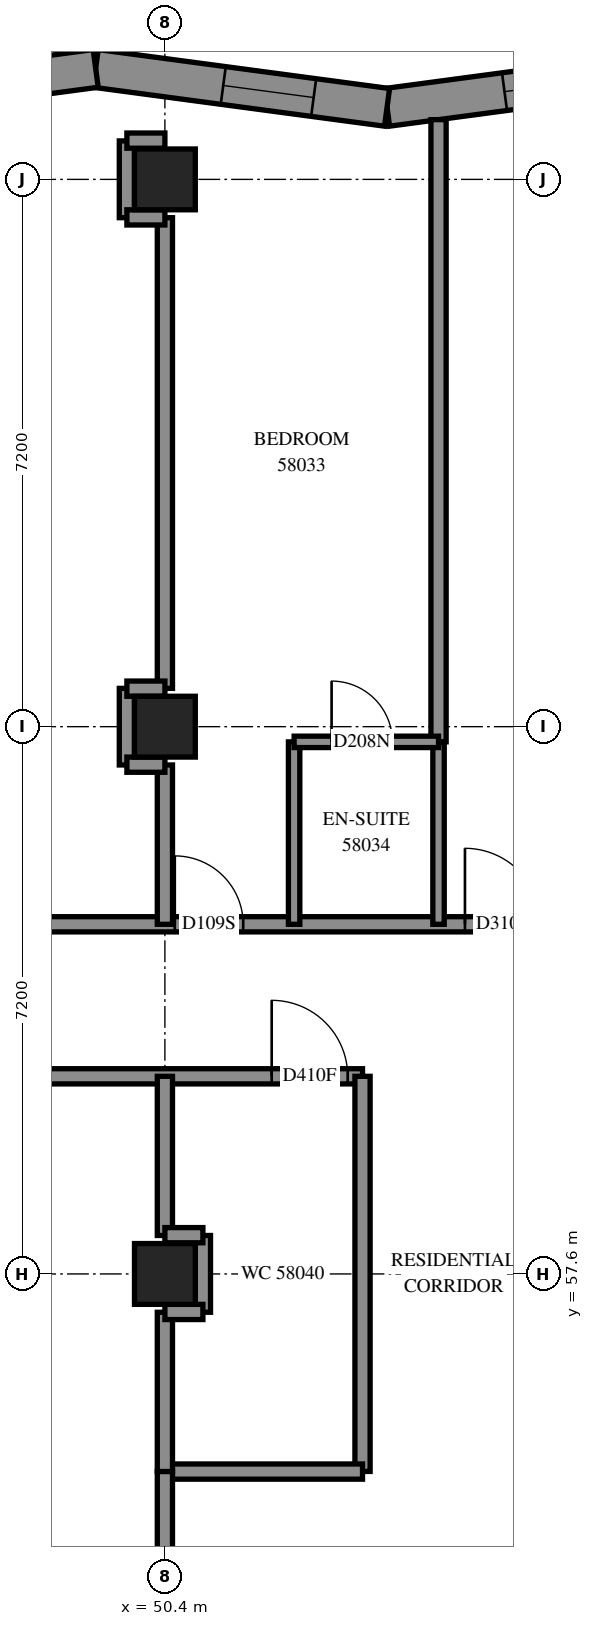
"""IFC4 building model, lengths in metres.
Left out: names, types, materials, properties, quantities, classifications, styles, units other than length and angle.
Written with IfcOpenShell. Run it as: python <this file> out.ifc"""

import sys

from ifc_helpers import new_model, si_unit, direction, frame, frame_2d, origin, origin_2d, place, context, subcontext, project, spatial, polyline, rectangle, outline, extrude, element, fill, save


model = new_model("IFC4")
c1 = context("Model", 3, precision=1e-05, world=origin(), true_north=direction((0.0, 1.0)))
c2 = subcontext(c1, "Body", "Model", "MODEL_VIEW")
j1 = project(units=[si_unit("LENGTHUNIT", "METRE"), si_unit("PLANEANGLEUNIT", "RADIAN")], contexts=[c1])
p1 = place(None, origin())
s1 = spatial("IfcSite", under=j1, at=p1, CompositionType="ELEMENT")
p2 = place(p1, origin())
s2 = spatial("IfcBuilding", under=s1, at=p2, CompositionType="ELEMENT")
p3 = place(p2, frame((0.0, 0.0, 213.4)))
s3 = spatial("IfcBuildingStorey", under=s2, at=p3, CompositionType="ELEMENT", Elevation=213.4)
for number, where, z_axis, x_axis in (
    (1, (50.4, 57.6, 0.0), (0.0, 0.0, 1.0), (1.0, 0.0, 0.0)),
    (2, (50.4, 64.8, 0.0), (0.0, 0.0, 1.0), (1.0, 0.0, 0.0)),
    (3, (50.4, 72.0, 0.0), (0.0, 0.0, 1.0), (1.0, 0.0, 0.0)),
):
    element("IfcColumn", number, at=place(p3, frame(where, z_axis=z_axis, x_axis=x_axis)), inside=s3, PredefinedType="COLUMN", context=c2, shape_type="SweptSolid", body=[
        extrude(rectangle(XDim=0.8, YDim=0.8, at=origin_2d()), origin(), (0.0, 0.0, 1.0), 3.1),
    ])
p4 = place(p3, frame((57.156, 73.46, 0.0), z_axis=(0.0, 0.0, 1.0), x_axis=(-0.9911985198, -0.13238389, 0.0)))
e4 = element("IfcWall", 4, at=p4, inside=s3, PredefinedType="SOLIDWALL", context=c2, shape_type="SweptSolid", body=[
    extrude(outline(polyline([(-0.033, -0.25), (3.834, -0.25), (3.901, 0.25), (0.033, 0.25), (-0.033, -0.25)])), origin(), (0.0, 0.0, 1.0), 3.1),
])
p5 = place(p4, frame((1.109, 0.0, 0.45)))
e5 = element("IfcOpeningElement", 5, at=p5, cuts=e4, PredefinedType="OPENING", context=c2, shape_type="SweptSolid", body=[
    extrude(rectangle(XDim=1.2, YDim=2.5, at=frame_2d((0.6, 1.25))), frame((0.0, 0.26, 0.0), z_axis=(0.0, -1.0, 0.0), x_axis=(1.0, 0.0, 0.0)), (0.0, 0.0, 1.0), 0.52),
])
p6 = place(p3, frame((53.323, 72.948, 0.0), z_axis=(0.0, 0.0, 1.0), x_axis=(-0.9911989729, 0.1323804972, 0.0)))
e6 = element("IfcWall", 6, at=p6, inside=s3, PredefinedType="SOLIDWALL", context=c2, shape_type="SweptSolid", body=[
    extrude(outline(polyline([(0.033, -0.25), (3.901, -0.25), (3.834, 0.25), (-0.033, 0.25), (0.033, -0.25)])), origin(), (0.0, 0.0, 1.0), 3.1),
])
p7 = place(p6, frame((0.974, 0.0, 0.45)))
e7 = element("IfcOpeningElement", 7, at=p7, cuts=e6, PredefinedType="OPENING", context=c2, shape_type="SweptSolid", body=[
    extrude(rectangle(XDim=1.2, YDim=2.5, at=frame_2d((0.6, 1.25))), frame((0.0, 0.26, 0.0), z_axis=(0.0, -1.0, 0.0), x_axis=(1.0, 0.0, 0.0)), (0.0, 0.0, 1.0), 0.52),
])
p8 = place(p3, frame((49.489, 73.46, 0.0), z_axis=(0.0, 0.0, 1.0), x_axis=(-0.9911985198, -0.13238389, 0.0)))
e8 = element("IfcWall", 8, at=p8, inside=s3, PredefinedType="SOLIDWALL", context=c2, shape_type="SweptSolid", body=[
    extrude(outline(polyline([(-0.033, -0.25), (3.834, -0.25), (3.901, 0.25), (0.033, 0.25), (-0.033, -0.25)])), origin(), (0.0, 0.0, 1.0), 3.1),
])
p9 = place(p8, frame((0.873, 0.0, 0.45)))
e9 = element("IfcOpeningElement", 9, at=p9, cuts=e8, PredefinedType="OPENING", context=c2, shape_type="SweptSolid", body=[
    extrude(rectangle(XDim=1.2, YDim=2.5, at=frame_2d((0.6, 1.25))), frame((0.0, 0.26, 0.0), z_axis=(0.0, -1.0, 0.0), x_axis=(1.0, 0.0, 0.0)), (0.0, 0.0, 1.0), 0.52),
])
p10 = place(p3, frame((36.0, 60.2, 0.0), z_axis=(0.0, 0.0, 1.0), x_axis=(1.0, 0.0, 0.0)))
e10 = element("IfcWall", 10, at=p10, inside=s3, PredefinedType="PARTITIONING", context=c2, shape_type="SweptSolid", body=[
    extrude(rectangle(XDim=17.0, YDim=0.2, at=frame_2d((8.5, 0.0))), origin(), (0.0, 0.0, 1.0), 3.1),
])
p11 = place(p10, frame((4.125, 0.0, 0.0)))
e11 = element("IfcOpeningElement", 11, at=p11, cuts=e10, PredefinedType="OPENING", context=c2, shape_type="SweptSolid", body=[
    extrude(rectangle(XDim=1.0, YDim=2.1, at=frame_2d((0.5, 1.05))), frame((0.0, 0.11, 0.0), z_axis=(0.0, -1.0, 0.0), x_axis=(1.0, 0.0, 0.0)), (0.0, 0.0, 1.0), 0.22),
])
p12 = place(p10, frame((7.6, 0.0, 0.0)))
e12 = element("IfcOpeningElement", 12, at=p12, cuts=e10, PredefinedType="OPENING", context=c2, shape_type="SweptSolid", body=[
    extrude(rectangle(XDim=0.9, YDim=2.1, at=frame_2d((0.45, 1.05))), frame((0.0, 0.11, 0.0), z_axis=(0.0, -1.0, 0.0), x_axis=(1.0, 0.0, 0.0)), (0.0, 0.0, 1.0), 0.22),
])
p13 = place(p10, frame((11.48, 0.0, 0.0)))
e13 = element("IfcOpeningElement", 13, at=p13, cuts=e10, PredefinedType="OPENING", context=c2, shape_type="SweptSolid", body=[
    extrude(rectangle(XDim=1.0, YDim=2.1, at=frame_2d((0.5, 1.05))), frame((0.0, 0.11, 0.0), z_axis=(0.0, -1.0, 0.0), x_axis=(1.0, 0.0, 0.0)), (0.0, 0.0, 1.0), 0.22),
])
p14 = place(p10, frame((15.805, 0.0, 0.0)))
e14 = element("IfcOpeningElement", 14, at=p14, cuts=e10, PredefinedType="OPENING", context=c2, shape_type="SweptSolid", body=[
    extrude(rectangle(XDim=1.0, YDim=2.1, at=frame_2d((0.5, 1.05))), frame((0.0, 0.11, 0.0), z_axis=(0.0, -1.0, 0.0), x_axis=(1.0, 0.0, 0.0)), (0.0, 0.0, 1.0), 0.22),
])
p15 = place(p3, frame((40.602, 62.2, 0.0), z_axis=(0.0, 0.0, 1.0), x_axis=(1.0, 0.0, 0.0)))
e15 = element("IfcWall", 15, at=p15, inside=s3, PredefinedType="PARTITIONING", context=c2, shape_type="SweptSolid", body=[
    extrude(rectangle(XDim=14.998, YDim=0.2, at=frame_2d((7.499, 0.0))), origin(), (0.0, 0.0, 1.0), 3.1),
])
p16 = place(p15, frame((6.308, 0.0, 0.0)))
e16 = element("IfcOpeningElement", 16, at=p16, cuts=e15, PredefinedType="OPENING", context=c2, shape_type="SweptSolid", body=[
    extrude(rectangle(XDim=1.0, YDim=2.1, at=frame_2d((0.5, 1.05))), frame((0.0, 0.11, 0.0), z_axis=(0.0, -1.0, 0.0), x_axis=(1.0, 0.0, 0.0)), (0.0, 0.0, 1.0), 0.22),
])
p17 = place(p15, frame((9.928, 0.0, 0.0)))
e17 = element("IfcOpeningElement", 17, at=p17, cuts=e15, PredefinedType="OPENING", context=c2, shape_type="SweptSolid", body=[
    extrude(rectangle(XDim=0.9, YDim=2.1, at=frame_2d((0.45, 1.05))), frame((0.0, 0.11, 0.0), z_axis=(0.0, -1.0, 0.0), x_axis=(1.0, 0.0, 0.0)), (0.0, 0.0, 1.0), 0.22),
])
p18 = place(p15, frame((13.746, 0.0, 0.0)))
e18 = element("IfcOpeningElement", 18, at=p18, cuts=e15, PredefinedType="OPENING", context=c2, shape_type="SweptSolid", body=[
    extrude(rectangle(XDim=1.0, YDim=2.1, at=frame_2d((0.5, 1.05))), frame((0.0, 0.11, 0.0), z_axis=(0.0, -1.0, 0.0), x_axis=(1.0, 0.0, 0.0)), (0.0, 0.0, 1.0), 0.22),
])
p19 = place(p3, frame((54.0, 64.6, 0.0), z_axis=(0.0, 0.0, 1.0), x_axis=(0.0, 1.0, 0.0)))
e19 = element("IfcWall", 19, at=p19, inside=s3, PredefinedType="PARTITIONING", context=c2, shape_type="SweptSolid", body=[
    extrude(rectangle(XDim=8.186, YDim=0.2, at=frame_2d((4.093, 0.0))), origin(), (0.0, 0.0, 1.0), 3.1),
])
p20 = place(p3, frame((50.4, 65.304, 0.0), z_axis=(0.0, 0.0, 1.0), x_axis=(0.0, 1.0, 0.0)))
e20 = element("IfcWall", 20, at=p20, inside=s3, PredefinedType="PARTITIONING", context=c2, shape_type="SweptSolid", body=[
    extrude(rectangle(XDim=6.192, YDim=0.2, at=frame_2d((3.096, 0.0))), origin(), (0.0, 0.0, 1.0), 3.1),
])
p21 = place(p3, frame((53.0, 55.002, 0.0), z_axis=(0.0, 0.0, 1.0), x_axis=(0.0, 1.0, 0.0)))
e21 = element("IfcWall", 21, at=p21, inside=s3, PredefinedType="PARTITIONING", context=c2, shape_type="SweptSolid", body=[
    extrude(rectangle(XDim=5.198, YDim=0.2, at=frame_2d((2.599, 0.0))), origin(), (0.0, 0.0, 1.0), 3.1),
])
p22 = place(p3, frame((50.4, 55.0, 0.0), z_axis=(0.0, 0.0, 1.0), x_axis=(1.0, 0.0, 0.0)))
e22 = element("IfcWall", 22, at=p22, inside=s3, PredefinedType="PARTITIONING", context=c2, shape_type="SweptSolid", body=[
    extrude(rectangle(XDim=2.6, YDim=0.2, at=frame_2d((1.3, 0.0))), origin(), (0.0, 0.0, 1.0), 3.1),
])
for number, where, z_axis, x_axis in (
    (23, (52.1, 62.2, 0.0), (0.0, 0.0, 1.0), (0.0, 1.0, 0.0)),
    (24, (54.0, 62.2, 0.0), (0.0, 0.0, 1.0), (0.0, 1.0, 0.0)),
):
    element("IfcWall", number, at=place(p3, frame(where, z_axis=z_axis, x_axis=x_axis)), inside=s3, PredefinedType="PARTITIONING", context=c2, shape_type="SweptSolid", body=[
        extrude(rectangle(XDim=2.4, YDim=0.15, at=frame_2d((1.2, 0.0))), origin(), (0.0, 0.0, 1.0), 3.1),
    ])
for number, where, z_axis, x_axis in (
    (25, (50.4, 62.2, 0.0), (0.0, 0.0, 1.0), (0.0, 1.0, 0.0)),
    (26, (50.4, 55.0, 0.0), (0.0, 0.0, 1.0), (0.0, 1.0, 0.0)),
):
    element("IfcWall", number, at=place(p3, frame(where, z_axis=z_axis, x_axis=x_axis)), inside=s3, PredefinedType="PARTITIONING", context=c2, shape_type="SweptSolid", body=[
        extrude(rectangle(XDim=2.096, YDim=0.2, at=frame_2d((1.048, 0.0))), origin(), (0.0, 0.0, 1.0), 3.1),
    ])
p23 = place(p3, frame((50.4, 58.106, 0.0), z_axis=(0.0, 0.0, 1.0), x_axis=(0.0, 1.0, 0.0)))
e27 = element("IfcWall", 27, at=p23, inside=s3, PredefinedType="PARTITIONING", context=c2, shape_type="SweptSolid", body=[
    extrude(rectangle(XDim=2.094, YDim=0.2, at=frame_2d((1.047, 0.0))), origin(), (0.0, 0.0, 1.0), 3.1),
])
p24 = place(p3, frame((50.4, 53.0, 0.0), z_axis=(0.0, 0.0, 1.0), x_axis=(0.0, 1.0, 0.0)))
e28 = element("IfcWall", 28, at=p24, inside=s3, PredefinedType="PARTITIONING", context=c2, shape_type="SweptSolid", body=[
    extrude(rectangle(XDim=2.0, YDim=0.2, at=frame_2d((1.0, 0.0))), origin(), (0.0, 0.0, 1.0), 3.1),
])
p25 = place(p3, frame((52.1, 64.6, 0.0), z_axis=(0.0, 0.0, 1.0), x_axis=(1.0, 0.0, 0.0)))
e29 = element("IfcWall", 29, at=p25, inside=s3, PredefinedType="PARTITIONING", context=c2, shape_type="SweptSolid", body=[
    extrude(rectangle(XDim=1.9, YDim=0.15, at=frame_2d((0.95, 0.0))), origin(), (0.0, 0.0, 1.0), 3.1),
])
p26 = place(p25, frame((0.493, 0.0, 0.0)))
e30 = element("IfcOpeningElement", 30, at=p26, cuts=e29, PredefinedType="OPENING", context=c2, shape_type="SweptSolid", body=[
    extrude(rectangle(XDim=0.8, YDim=2.1, at=frame_2d((0.4, 1.05))), frame((0.0, 0.085, 0.0), z_axis=(0.0, -1.0, 0.0), x_axis=(1.0, 0.0, 0.0)), (0.0, 0.0, 1.0), 0.17),
])
for number, where, z_axis, x_axis in (
    (31, (50.9, 57.096, 0.0), (0.0, 0.0, 1.0), (0.0, 1.0, 0.0)),
    (32, (49.9, 71.496, 0.0), (0.0, 0.0, 1.0), (0.0, 1.0, 0.0)),
):
    element("IfcWall", number, at=place(p3, frame(where, z_axis=z_axis, x_axis=x_axis)), inside=s3, PredefinedType="PARTITIONING", context=c2, shape_type="SweptSolid", body=[
        extrude(rectangle(XDim=1.01, YDim=0.2, at=frame_2d((0.505, 0.0))), origin(), (0.0, 0.0, 1.0), 3.1),
    ])
p27 = place(p3, frame((49.9, 64.296, 0.0), z_axis=(0.0, 0.0, 1.0), x_axis=(0.0, 1.0, 0.0)))
e33 = element("IfcWall", 33, at=p27, inside=s3, PredefinedType="PARTITIONING", context=c2, shape_type="SweptSolid", body=[
    extrude(rectangle(XDim=1.008, YDim=0.2, at=frame_2d((0.504, 0.0))), origin(), (0.0, 0.0, 1.0), 3.1),
])
for number, where, z_axis, x_axis in (
    (34, (49.9, 72.51, 0.0), (0.0, 0.0, 1.0), (1.0, 0.0, 0.0)),
    (35, (49.9, 71.5, 0.0), (0.0, 0.0, 1.0), (1.0, 0.0, 0.0)),
    (36, (49.9, 65.3, 0.0), (0.0, 0.0, 1.0), (1.0, 0.0, 0.0)),
    (37, (49.9, 64.3, 0.0), (0.0, 0.0, 1.0), (1.0, 0.0, 0.0)),
    (38, (50.4, 58.11, 0.0), (0.0, 0.0, 1.0), (1.0, 0.0, 0.0)),
    (39, (50.4, 57.1, 0.0), (0.0, 0.0, 1.0), (1.0, 0.0, 0.0)),
):
    element("IfcWall", number, at=place(p3, frame(where, z_axis=z_axis, x_axis=x_axis)), inside=s3, PredefinedType="PARTITIONING", context=c2, shape_type="SweptSolid", body=[
        extrude(rectangle(XDim=0.5, YDim=0.2, at=frame_2d((0.25, 0.0))), origin(), (0.0, 0.0, 1.0), 3.1),
    ])
p28 = place(p5, origin())
e40 = element("IfcWindow", 40, at=p28, inside=s3, PartitioningType="SINGLE_PANEL", PredefinedType="WINDOW", context=c2, shape_type="SweptSolid", body=[
    extrude(rectangle(XDim=1.2, YDim=2.5, at=frame_2d((0.6, 1.25))), frame((0.0, 0.18, 0.0), z_axis=(0.0, -1.0, 0.0), x_axis=(1.0, 0.0, 0.0)), (0.0, 0.0, 1.0), 0.06),
])
fill(e5, e40)
p29 = place(p7, origin())
e41 = element("IfcWindow", 41, at=p29, inside=s3, PartitioningType="SINGLE_PANEL", PredefinedType="WINDOW", context=c2, shape_type="SweptSolid", body=[
    extrude(rectangle(XDim=1.2, YDim=2.5, at=frame_2d((0.6, 1.25))), frame((0.0, 0.18, 0.0), z_axis=(0.0, -1.0, 0.0), x_axis=(1.0, 0.0, 0.0)), (0.0, 0.0, 1.0), 0.06),
])
fill(e7, e41)
p30 = place(p17, origin())
e42 = element("IfcDoor", 42, at=p30, inside=s3, OperationType="SINGLE_SWING_RIGHT", PredefinedType="DOOR", context=c2, shape_type="SweptSolid", body=[
    extrude(rectangle(XDim=0.9, YDim=2.1, at=frame_2d((0.45, 1.05))), frame((0.0, 0.025, 0.0), z_axis=(0.0, -1.0, 0.0), x_axis=(1.0, 0.0, 0.0)), (0.0, 0.0, 1.0), 0.05),
])
fill(e17, e42)
p31 = place(p26, origin())
e43 = element("IfcDoor", 43, at=p31, inside=s3, OperationType="SINGLE_SWING_RIGHT", PredefinedType="DOOR", context=c2, shape_type="SweptSolid", body=[
    extrude(rectangle(XDim=0.8, YDim=2.1, at=frame_2d((0.4, 1.05))), frame((0.0, 0.025, 0.0), z_axis=(0.0, -1.0, 0.0), x_axis=(1.0, 0.0, 0.0)), (0.0, 0.0, 1.0), 0.05),
])
fill(e30, e43)
p32 = place(p18, origin())
e44 = element("IfcDoor", 44, at=p32, inside=s3, OperationType="SINGLE_SWING_LEFT", PredefinedType="DOOR", context=c2, shape_type="SweptSolid", body=[
    extrude(rectangle(XDim=1.0, YDim=2.1, at=frame_2d((0.5, 1.05))), frame((0.0, 0.025, 0.0), z_axis=(0.0, -1.0, 0.0), x_axis=(1.0, 0.0, 0.0)), (0.0, 0.0, 1.0), 0.05),
])
fill(e18, e44)
p33 = place(p14, origin())
e45 = element("IfcDoor", 45, at=p33, inside=s3, OperationType="SINGLE_SWING_LEFT", PredefinedType="DOOR", context=c2, shape_type="SweptSolid", body=[
    extrude(rectangle(XDim=1.0, YDim=2.1, at=frame_2d((0.5, 1.05))), frame((0.0, 0.025, 0.0), z_axis=(0.0, -1.0, 0.0), x_axis=(1.0, 0.0, 0.0)), (0.0, 0.0, 1.0), 0.05),
])
fill(e14, e45)
save(model, sys.argv[1])
